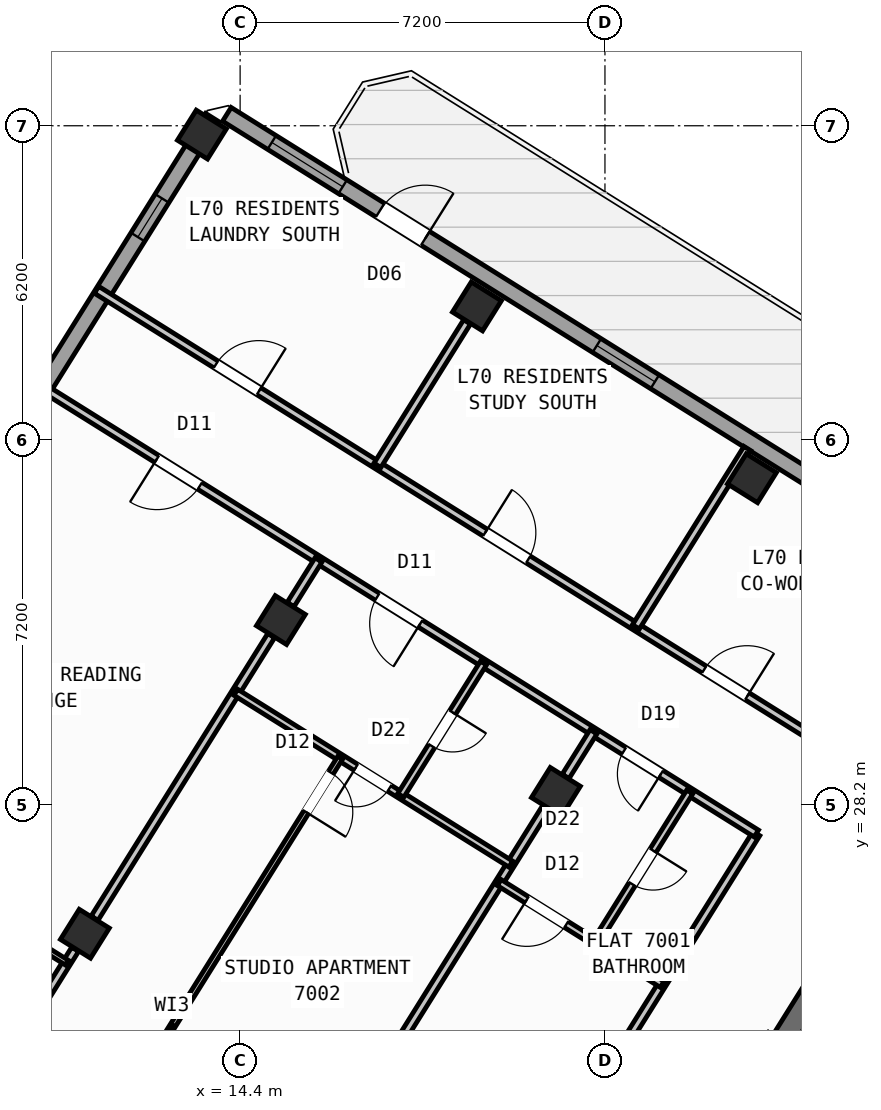
"""IFC4 building model, lengths in metres.
Left out: names, types, materials, properties, quantities, classifications, styles, units other than length and angle.
Written with IfcOpenShell. Run it as: python <this file> out.ifc"""

import sys

from ifc_helpers import new_model, si_unit, direction, frame, frame_2d, origin, origin_2d, place, context, subcontext, project, spatial, rectangle, hollow_rectangle, extrude, source, transform, mapped, element, fill, save


model = new_model("IFC4")
c1 = context("Model", 3, precision=1e-05, world=origin(), true_north=direction((0.0, 1.0)))
c2 = subcontext(c1, "Body", "Model", "MODEL_VIEW")
j1 = project(units=[si_unit("LENGTHUNIT", "METRE"), si_unit("PLANEANGLEUNIT", "RADIAN")], contexts=[c1])
p1 = place(None, origin())
s1 = spatial("IfcSite", under=j1, at=p1, CompositionType="ELEMENT")
p2 = place(p1, origin())
s2 = spatial("IfcBuilding", under=s1, at=p2, CompositionType="ELEMENT")
p3 = place(p2, frame((0.0, 0.0, 277.2)))
s3 = spatial("IfcBuildingStorey", under=s2, at=p3, CompositionType="ELEMENT", Elevation=277.2)
p4 = place(p3, frame((26.007, 24.976, 0.0), z_axis=(0.0, 0.0, 1.0), x_axis=(-0.529931155655, -0.848040665456, 0.0)))
e1 = element("IfcWall", 1, at=p4, inside=s3, PredefinedType="SHEAR", context=c2, shape_type="SweptSolid", body=[
    extrude(rectangle(XDim=6.475, YDim=0.45, at=frame_2d((3.238, 0.0))), origin(), (0.0, 0.0, 1.0), 3.35),
])
m1 = source(origin(), c2, "Body", "SweptSolid", [
    extrude(hollow_rectangle(XDim=0.7, YDim=0.7, WallThickness=0.028, at=origin_2d()), origin(), (0.0, 0.0, 1.0), 3.6),
])
for number, where, z_axis, x_axis in (
    (2, (24.5, 34.643, 0.0), (0.0, 0.0, 1.0), (-0.848, 0.53, 0.0)),
    (3, (20.632, 28.452, 0.0), (0.0, 0.0, 1.0), (-0.848, 0.53, 0.0)),
    (4, (19.073, 38.034, 0.0), (0.0, 0.0, 1.0), (-0.848, 0.53, 0.0)),
    (5, (15.205, 31.844, 0.0), (0.0, 0.0, 1.0), (-0.848, 0.53, 0.0)),
    (6, (11.336, 25.653, 0.0), (0.0, 0.0, 1.0), (-0.848, 0.53, 0.0)),
    (7, (13.646, 41.426, 0.0), (0.0, 0.0, 1.0), (-0.848, 0.53, 0.0)),
):
    element("IfcColumn", number, at=place(p3, frame(where, z_axis=z_axis, x_axis=x_axis)), inside=s3, PredefinedType="COLUMN", context=c2, shape_type="MappedRepresentation", body=[
        mapped(m1, transform((0.0, 0.0, 0.0), scale=1.0)),
    ])
p5 = place(p3, frame((2.415, 23.452, 0.0), z_axis=(0.0, 0.0, 1.0), x_axis=(0.52991049553, 0.848053575387, 0.0)))
e8 = element("IfcWall", 8, at=p5, inside=s3, PredefinedType="STANDARD", context=c2, shape_type="SweptSolid", body=[
    extrude(rectangle(XDim=21.587, YDim=0.32, at=frame_2d((10.794, 0.0))), origin(), (0.0, 0.0, 1.0), 3.35),
])
p6 = place(p5, frame((2.368, 0.0, 0.9)))
e9 = element("IfcOpeningElement", 9, at=p6, cuts=e8, PredefinedType="OPENING", context=c2, shape_type="SweptSolid", body=[
    extrude(rectangle(XDim=1.65, YDim=1.45, at=frame_2d((0.825, 0.725))), frame((0.0, 0.17, 0.0), z_axis=(0.0, -1.0, 0.0), x_axis=(1.0, 0.0, 0.0)), (0.0, 0.0, 1.0), 0.34),
])
p7 = place(p5, frame((8.094, 0.0, 0.9)))
e10 = element("IfcOpeningElement", 10, at=p7, cuts=e8, PredefinedType="OPENING", context=c2, shape_type="SweptSolid", body=[
    extrude(rectangle(XDim=1.35, YDim=1.45, at=frame_2d((0.675, 0.725))), frame((0.0, 0.17, 0.0), z_axis=(0.0, -1.0, 0.0), x_axis=(1.0, 0.0, 0.0)), (0.0, 0.0, 1.0), 0.34),
])
p8 = place(p5, frame((11.044, 0.0, 0.9)))
e11 = element("IfcOpeningElement", 11, at=p8, cuts=e8, PredefinedType="OPENING", context=c2, shape_type="SweptSolid", body=[
    extrude(rectangle(XDim=1.35, YDim=1.45, at=frame_2d((0.675, 0.725))), frame((0.0, 0.17, 0.0), z_axis=(0.0, -1.0, 0.0), x_axis=(1.0, 0.0, 0.0)), (0.0, 0.0, 1.0), 0.34),
])
p9 = place(p5, frame((18.809, 0.0, 1.0)))
e12 = element("IfcOpeningElement", 12, at=p9, cuts=e8, PredefinedType="OPENING", context=c2, shape_type="SweptSolid", body=[
    extrude(rectangle(XDim=0.9, YDim=1.25, at=frame_2d((0.45, 0.625))), frame((0.0, 0.17, 0.0), z_axis=(0.0, -1.0, 0.0), x_axis=(1.0, 0.0, 0.0)), (0.0, 0.0, 1.0), 0.34),
])
p10 = place(p3, frame((14.138, 41.825, 0.0), z_axis=(0.0, 0.0, 1.0), x_axis=(0.848046498049, -0.529921821731, 0.0)))
e13 = element("IfcWall", 13, at=p10, inside=s3, PredefinedType="STANDARD", context=c2, shape_type="SweptSolid", body=[
    extrude(rectangle(XDim=31.588, YDim=0.32, at=frame_2d((15.794, 0.0))), origin(), (0.0, 0.0, 1.0), 3.35),
])
p11 = place(p10, frame((3.568, 0.0, 0.0)))
e14 = element("IfcOpeningElement", 14, at=p11, cuts=e13, PredefinedType="OPENING", context=c2, shape_type="SweptSolid", body=[
    extrude(rectangle(XDim=1.05, YDim=2.15, at=frame_2d((0.525, 1.075))), frame((0.0, 0.17, 0.0), z_axis=(0.0, -1.0, 0.0), x_axis=(1.0, 0.0, 0.0)), (0.0, 0.0, 1.0), 0.34),
])
p12 = place(p10, frame((1.046, 0.0, 0.9)))
e15 = element("IfcOpeningElement", 15, at=p12, cuts=e13, PredefinedType="OPENING", context=c2, shape_type="SweptSolid", body=[
    extrude(rectangle(XDim=1.65, YDim=1.45, at=frame_2d((0.825, 0.725))), frame((0.0, 0.17, 0.0), z_axis=(0.0, -1.0, 0.0), x_axis=(1.0, 0.0, 0.0)), (0.0, 0.0, 1.0), 0.34),
])
p13 = place(p10, frame((8.61, 0.0, 0.9)))
e16 = element("IfcOpeningElement", 16, at=p13, cuts=e13, PredefinedType="OPENING", context=c2, shape_type="SweptSolid", body=[
    extrude(rectangle(XDim=1.35, YDim=1.45, at=frame_2d((0.675, 0.725))), frame((0.0, 0.17, 0.0), z_axis=(0.0, -1.0, 0.0), x_axis=(1.0, 0.0, 0.0)), (0.0, 0.0, 1.0), 0.34),
])
p14 = place(p10, frame((13.599, 0.0, 0.95)))
e17 = element("IfcOpeningElement", 17, at=p14, cuts=e13, PredefinedType="OPENING", context=c2, shape_type="SweptSolid", body=[
    extrude(rectangle(XDim=1.95, YDim=1.35, at=frame_2d((0.975, 0.675))), frame((0.0, 0.17, 0.0), z_axis=(0.0, -1.0, 0.0), x_axis=(1.0, 0.0, 0.0)), (0.0, 0.0, 1.0), 0.34),
])
p15 = place(p10, frame((17.154, 0.0, 1.0)))
e18 = element("IfcOpeningElement", 18, at=p15, cuts=e13, PredefinedType="OPENING", context=c2, shape_type="SweptSolid", body=[
    extrude(rectangle(XDim=0.9, YDim=1.25, at=frame_2d((0.45, 0.625))), frame((0.0, 0.17, 0.0), z_axis=(0.0, -1.0, 0.0), x_axis=(1.0, 0.0, 0.0)), (0.0, 0.0, 1.0), 0.34),
])
p16 = place(p10, frame((21.719, 0.0, 0.9)))
e19 = element("IfcOpeningElement", 19, at=p16, cuts=e13, PredefinedType="OPENING", context=c2, shape_type="SweptSolid", body=[
    extrude(rectangle(XDim=1.65, YDim=1.45, at=frame_2d((0.825, 0.725))), frame((0.0, 0.17, 0.0), z_axis=(0.0, -1.0, 0.0), x_axis=(1.0, 0.0, 0.0)), (0.0, 0.0, 1.0), 0.34),
])
p17 = place(p10, frame((27.419, 0.0, 0.9)))
e20 = element("IfcOpeningElement", 20, at=p17, cuts=e13, PredefinedType="OPENING", context=c2, shape_type="SweptSolid", body=[
    extrude(rectangle(XDim=1.65, YDim=1.45, at=frame_2d((0.825, 0.725))), frame((0.0, 0.17, 0.0), z_axis=(0.0, -1.0, 0.0), x_axis=(1.0, 0.0, 0.0)), (0.0, 0.0, 1.0), 0.34),
])
p18 = place(p3, frame((24.588, 27.631, 0.0), z_axis=(0.0, 0.0, 1.0), x_axis=(-0.529914586043, -0.848051019396, 0.0)))
e21 = element("IfcWall", 21, at=p18, inside=s3, PredefinedType="PARTITIONING", context=c2, shape_type="SweptSolid", body=[
    extrude(rectangle(XDim=15.35, YDim=0.16, at=frame_2d((7.675, 0.0))), origin(), (0.0, 0.0, 1.0), 3.34),
])
p19 = place(p3, frame((25.754, 29.497, 0.0), z_axis=(0.0, 0.0, 1.0), x_axis=(-0.848045850158, 0.529922858565, 0.0)))
e22 = element("IfcWall", 22, at=p19, inside=s3, PredefinedType="PARTITIONING", context=c2, shape_type="SweptSolid", body=[
    extrude(rectangle(XDim=16.73, YDim=0.16, at=frame_2d((8.365, 0.0))), origin(), (0.0, 0.0, 1.0), 3.34),
])
p20 = place(p19, frame((1.588, 0.0, 0.0)))
e23 = element("IfcOpeningElement", 23, at=p20, cuts=e22, PredefinedType="OPENING", context=c2, shape_type="SweptSolid", body=[
    extrude(rectangle(XDim=1.0, YDim=2.1, at=frame_2d((0.5, 1.05))), frame((0.0, 0.09, 0.0), z_axis=(0.0, -1.0, 0.0), x_axis=(1.0, 0.0, 0.0)), (0.0, 0.0, 1.0), 0.18),
])
p21 = place(p19, frame((6.685, 0.0, 0.0)))
e24 = element("IfcOpeningElement", 24, at=p21, cuts=e22, PredefinedType="OPENING", context=c2, shape_type="SweptSolid", body=[
    extrude(rectangle(XDim=1.0, YDim=2.1, at=frame_2d((0.5, 1.05))), frame((0.0, 0.09, 0.0), z_axis=(0.0, -1.0, 0.0), x_axis=(1.0, 0.0, 0.0)), (0.0, 0.0, 1.0), 0.18),
])
p22 = place(p19, frame((12.951, 0.0, 0.0)))
e25 = element("IfcOpeningElement", 25, at=p22, cuts=e22, PredefinedType="OPENING", context=c2, shape_type="SweptSolid", body=[
    extrude(rectangle(XDim=1.0, YDim=2.1, at=frame_2d((0.5, 1.05))), frame((0.0, 0.09, 0.0), z_axis=(0.0, -1.0, 0.0), x_axis=(1.0, 0.0, 0.0)), (0.0, 0.0, 1.0), 0.18),
])
p23 = place(p3, frame((24.588, 27.631, 0.0), z_axis=(0.0, 0.0, 1.0), x_axis=(-0.848041752158, 0.529929416617, 0.0)))
e26 = element("IfcWall", 26, at=p23, inside=s3, PredefinedType="PARTITIONING", context=c2, shape_type="SweptSolid", body=[
    extrude(rectangle(XDim=16.73, YDim=0.16, at=frame_2d((8.365, 0.0))), origin(), (0.0, 0.0, 1.0), 3.34),
])
p24 = place(p23, frame((2.22, 0.0, 0.0)))
e27 = element("IfcOpeningElement", 27, at=p24, cuts=e26, PredefinedType="OPENING", context=c2, shape_type="SweptSolid", body=[
    extrude(rectangle(XDim=0.86, YDim=2.05, at=frame_2d((0.43, 1.025))), frame((0.0, 0.09, 0.0), z_axis=(0.0, -1.0, 0.0), x_axis=(1.0, 0.0, 0.0)), (0.0, 0.0, 1.0), 0.18),
])
p25 = place(p23, frame((7.82, 0.0, 0.0)))
e28 = element("IfcOpeningElement", 28, at=p25, cuts=e26, PredefinedType="OPENING", context=c2, shape_type="SweptSolid", body=[
    extrude(rectangle(XDim=1.0, YDim=2.1, at=frame_2d((0.5, 1.05))), frame((0.0, 0.09, 0.0), z_axis=(0.0, -1.0, 0.0), x_axis=(1.0, 0.0, 0.0)), (0.0, 0.0, 1.0), 0.18),
])
p26 = place(p23, frame((12.95, 0.0, 0.0)))
e29 = element("IfcOpeningElement", 29, at=p26, cuts=e26, PredefinedType="OPENING", context=c2, shape_type="SweptSolid", body=[
    extrude(rectangle(XDim=1.0, YDim=2.1, at=frame_2d((0.5, 1.05))), frame((0.0, 0.09, 0.0), z_axis=(0.0, -1.0, 0.0), x_axis=(1.0, 0.0, 0.0)), (0.0, 0.0, 1.0), 0.18),
])
p27 = place(p3, frame((21.374, 29.639, 0.0), z_axis=(0.0, 0.0, 1.0), x_axis=(-0.529872092657, -0.848077570405, 0.0)))
e30 = element("IfcWall", 30, at=p27, inside=s3, PredefinedType="PARTITIONING", context=c2, shape_type="SweptSolid", body=[
    extrude(rectangle(XDim=1.038, YDim=0.16, at=frame_2d((0.519, 0.0))), origin(), (0.0, 0.0, 1.0), 2.875),
])
p28 = place(p3, frame((20.44, 28.145, 0.0), z_axis=(0.0, 0.0, 1.0), x_axis=(-0.529938869374, -0.84803584519, 0.0)))
e31 = element("IfcWall", 31, at=p28, inside=s3, PredefinedType="PARTITIONING", context=c2, shape_type="SweptSolid", body=[
    extrude(rectangle(XDim=6.576, YDim=0.16, at=frame_2d((3.288, 0.0))), origin(), (0.0, 0.0, 1.0), 2.875),
])
p29 = place(p3, frame((22.728, 24.654, 0.0), z_axis=(0.0, 0.0, 1.0), x_axis=(-0.848059820872, 0.529900500304, 0.0)))
e32 = element("IfcWall", 32, at=p29, inside=s3, PredefinedType="PLUMBINGWALL", context=c2, shape_type="SweptSolid", body=[
    extrude(rectangle(XDim=3.79, YDim=0.14, at=frame_2d((1.895, 0.0))), origin(), (0.0, 0.0, 1.0), 3.34),
])
p30 = place(p29, frame((2.23, 0.0, 0.0)))
e33 = element("IfcOpeningElement", 33, at=p30, cuts=e32, PredefinedType="OPENING", context=c2, shape_type="SweptSolid", body=[
    extrude(rectangle(XDim=0.92, YDim=2.08, at=frame_2d((0.46, 1.04))), frame((0.0, 0.08, 0.0), z_axis=(0.0, -1.0, 0.0), x_axis=(1.0, 0.0, 0.0)), (0.0, 0.0, 1.0), 0.16),
])
p31 = place(p3, frame((23.273, 28.452, 0.0), z_axis=(0.0, 0.0, 1.0), x_axis=(-0.529867639402, -0.848080352747, 0.0)))
e34 = element("IfcWall", 34, at=p31, inside=s3, PredefinedType="PLUMBINGWALL", context=c2, shape_type="SweptSolid", body=[
    extrude(rectangle(XDim=3.51, YDim=0.14, at=frame_2d((1.755, 0.0))), origin(), (0.0, 0.0, 1.0), 3.025),
])
p32 = place(p31, frame((1.365, 0.0, 0.0)))
e35 = element("IfcOpeningElement", 35, at=p32, cuts=e34, PredefinedType="OPENING", context=c2, shape_type="SweptSolid", body=[
    extrude(rectangle(XDim=0.78, YDim=2.05, at=frame_2d((0.39, 1.025))), frame((0.0, 0.08, 0.0), z_axis=(0.0, -1.0, 0.0), x_axis=(1.0, 0.0, 0.0)), (0.0, 0.0, 1.0), 0.16),
])
p33 = place(p3, frame((15.946, 33.031, 0.0), z_axis=(0.0, 0.0, 1.0), x_axis=(-0.529977795385, -0.848011519025, 0.0)))
e36 = element("IfcWall", 36, at=p33, inside=s3, PredefinedType="PARTITIONING", context=c2, shape_type="SweptSolid", body=[
    extrude(rectangle(XDim=1.038, YDim=0.16, at=frame_2d((0.519, 0.0))), origin(), (0.0, 0.0, 1.0), 2.875),
])
p34 = place(p3, frame((15.013, 31.537, 0.0), z_axis=(0.0, 0.0, 1.0), x_axis=(-0.529922185033, -0.848046271031, 0.0)))
e37 = element("IfcWall", 37, at=p34, inside=s3, PredefinedType="PARTITIONING", context=c2, shape_type="SweptSolid", body=[
    extrude(rectangle(XDim=6.576, YDim=0.16, at=frame_2d((3.288, 0.0))), origin(), (0.0, 0.0, 1.0), 2.875),
])
p35 = place(p3, frame((11.144, 25.346, 0.0), z_axis=(0.0, 0.0, 1.0), x_axis=(-0.529904903214, -0.848057069748, 0.0)))
e38 = element("IfcWall", 38, at=p35, inside=s3, PredefinedType="PARTITIONING", context=c2, shape_type="SweptSolid", body=[
    extrude(rectangle(XDim=5.601, YDim=0.16, at=frame_2d((2.801, 0.0))), origin(), (0.0, 0.0, 1.0), 2.875),
])
p36 = place(p3, frame((19.742, 27.027, 0.0), z_axis=(0.0, 0.0, 1.0), x_axis=(-0.848039019877, 0.529933789039, 0.0)))
e39 = element("IfcWall", 39, at=p36, inside=s3, PredefinedType="PLUMBINGWALL", context=c2, shape_type="SweptSolid", body=[
    extrude(rectangle(XDim=6.4, YDim=0.14, at=frame_2d((3.2, 0.0))), origin(), (0.0, 0.0, 1.0), 3.34),
])
p37 = place(p36, frame((2.824, 0.0, 0.0)))
e40 = element("IfcOpeningElement", 40, at=p37, cuts=e39, PredefinedType="OPENING", context=c2, shape_type="SweptSolid", body=[
    extrude(rectangle(XDim=0.78, YDim=2.05, at=frame_2d((0.39, 1.025))), frame((0.0, 0.08, 0.0), z_axis=(0.0, -1.0, 0.0), x_axis=(1.0, 0.0, 0.0)), (0.0, 0.0, 1.0), 0.16),
])
p38 = place(p3, frame((19.203, 30.996, 0.0), z_axis=(0.0, 0.0, 1.0), x_axis=(-0.52992768316, -0.848042835369, 0.0)))
e41 = element("IfcWall", 41, at=p38, inside=s3, PredefinedType="PLUMBINGWALL", context=c2, shape_type="SweptSolid", body=[
    extrude(rectangle(XDim=3.08, YDim=0.14, at=frame_2d((1.54, 0.0))), origin(), (0.0, 0.0, 1.0), 3.34),
])
p39 = place(p38, frame((1.15, 0.0, 0.0)))
e42 = element("IfcOpeningElement", 42, at=p39, cuts=e41, PredefinedType="OPENING", context=c2, shape_type="SweptSolid", body=[
    extrude(rectangle(XDim=0.78, YDim=2.05, at=frame_2d((0.39, 1.025))), frame((0.0, 0.08, 0.0), z_axis=(0.0, -1.0, 0.0), x_axis=(1.0, 0.0, 0.0)), (0.0, 0.0, 1.0), 0.16),
])
p40 = place(p3, frame((16.377, 29.13, 0.0), z_axis=(0.0, 0.0, 1.0), x_axis=(-0.529923687379, -0.848045332252, 0.0)))
e43 = element("IfcWall", 43, at=p40, inside=s3, PredefinedType="PARTITIONING", context=c2, shape_type="SweptSolid", body=[
    extrude(rectangle(XDim=12.54, YDim=0.11, at=frame_2d((6.27, 0.0))), origin(), (0.0, 0.0, 1.0), 3.34),
])
p41 = place(p40, frame((0.35, 0.0, 0.0)))
e44 = element("IfcOpeningElement", 44, at=p41, cuts=e43, PredefinedType="OPENING", context=c2, shape_type="SweptSolid", body=[
    extrude(rectangle(XDim=0.92, YDim=2.08, at=frame_2d((0.46, 1.04))), frame((0.0, 0.065, 0.0), z_axis=(0.0, -1.0, 0.0), x_axis=(1.0, 0.0, 0.0)), (0.0, 0.0, 1.0), 0.13),
])
p42 = place(p3, frame((10.98, 25.083, 0.0), z_axis=(0.0, 0.0, 1.0), x_axis=(-0.848048787466, 0.529918157905, 0.0)))
e45 = element("IfcWall", 45, at=p42, inside=s3, PredefinedType="PARTITIONING", context=c2, shape_type="SweptSolid", body=[
    extrude(rectangle(XDim=6.52, YDim=0.11, at=frame_2d((3.26, 0.0))), origin(), (0.0, 0.0, 1.0), 3.34),
])
p43 = place(p42, frame((2.8, 0.0, 0.0)))
e46 = element("IfcOpeningElement", 46, at=p43, cuts=e45, PredefinedType="OPENING", context=c2, shape_type="SweptSolid", body=[
    extrude(rectangle(XDim=0.92, YDim=2.08, at=frame_2d((0.46, 1.04))), frame((0.0, 0.065, 0.0), z_axis=(0.0, -1.0, 0.0), x_axis=(1.0, 0.0, 0.0)), (0.0, 0.0, 1.0), 0.13),
])
p44 = place(p3, frame((24.411, 35.229, 0.0), z_axis=(0.0, 0.0, 1.0), x_axis=(-0.529940769753, -0.848034657637, 0.0)))
e47 = element("IfcWall", 47, at=p44, inside=s3, PredefinedType="PARTITIONING", context=c2, shape_type="SweptSolid", body=[
    extrude(rectangle(XDim=4.15, YDim=0.16, at=frame_2d((2.075, 0.0))), origin(), (0.0, 0.0, 1.0), 3.34),
])
p45 = place(p3, frame((18.879, 37.729, 0.0), z_axis=(0.0, 0.0, 1.0), x_axis=(-0.529952920244, -0.848027064618, 0.0)))
e48 = element("IfcWall", 48, at=p45, inside=s3, PredefinedType="PARTITIONING", context=c2, shape_type="SweptSolid", body=[
    extrude(rectangle(XDim=3.338, YDim=0.16, at=frame_2d((1.669, 0.0))), origin(), (0.0, 0.0, 1.0), 2.875),
])
m2 = source(origin(), c2, "Body", "SweptSolid", [
    extrude(rectangle(XDim=1.05, YDim=2.15, at=frame_2d((0.525, 1.075))), frame((0.0, 0.025, 0.0), z_axis=(0.0, -1.0, 0.0), x_axis=(1.0, 0.0, 0.0)), (0.0, 0.0, 1.0), 0.05),
])
p46 = place(p11, origin())
e49 = element("IfcDoor", 49, at=p46, inside=s3, OperationType="SINGLE_SWING_RIGHT", PredefinedType="DOOR", context=c2, shape_type="MappedRepresentation", body=[
    mapped(m2, transform((0.0, 0.0, 0.0), scale=1.0)),
])
fill(e14, e49)
m3 = source(origin(), c2, "Body", "SweptSolid", [
    extrude(rectangle(XDim=0.9, YDim=1.25, at=frame_2d((0.45, 0.625))), frame((0.0, 0.03, 0.0), z_axis=(0.0, -1.0, 0.0), x_axis=(1.0, 0.0, 0.0)), (0.0, 0.0, 1.0), 0.06),
])
p47 = place(p9, origin())
e50 = element("IfcWindow", 50, at=p47, inside=s3, PartitioningType="SINGLE_PANEL", PredefinedType="WINDOW", context=c2, shape_type="MappedRepresentation", body=[
    mapped(m3, transform((0.0, 0.0, 0.0), scale=1.0)),
])
fill(e12, e50)
m4 = source(origin(), c2, "Body", "SweptSolid", [
    extrude(rectangle(XDim=1.65, YDim=1.45, at=frame_2d((0.825, 0.725))), frame((0.0, 0.03, 0.0), z_axis=(0.0, -1.0, 0.0), x_axis=(1.0, 0.0, 0.0)), (0.0, 0.0, 1.0), 0.06),
])
p48 = place(p12, origin())
e51 = element("IfcWindow", 51, at=p48, inside=s3, PartitioningType="SINGLE_PANEL", PredefinedType="WINDOW", context=c2, shape_type="MappedRepresentation", body=[
    mapped(m4, transform((0.0, 0.0, 0.0), scale=1.0)),
])
fill(e15, e51)
m5 = source(origin(), c2, "Body", "SweptSolid", [
    extrude(rectangle(XDim=1.35, YDim=1.45, at=frame_2d((0.675, 0.725))), frame((0.0, 0.03, 0.0), z_axis=(0.0, -1.0, 0.0), x_axis=(1.0, 0.0, 0.0)), (0.0, 0.0, 1.0), 0.06),
])
p49 = place(p13, origin())
e52 = element("IfcWindow", 52, at=p49, inside=s3, PartitioningType="SINGLE_PANEL", PredefinedType="WINDOW", context=c2, shape_type="MappedRepresentation", body=[
    mapped(m5, transform((0.0, 0.0, 0.0), scale=1.0)),
])
fill(e16, e52)
m6 = source(origin(), c2, "Body", "SweptSolid", [
    extrude(rectangle(XDim=0.86, YDim=2.05, at=frame_2d((0.43, 1.025))), frame((0.0, 0.025, 0.0), z_axis=(0.0, -1.0, 0.0), x_axis=(1.0, 0.0, 0.0)), (0.0, 0.0, 1.0), 0.05),
])
p50 = place(p24, origin())
e53 = element("IfcDoor", 53, at=p50, inside=s3, OperationType="SINGLE_SWING_LEFT", PredefinedType="DOOR", context=c2, shape_type="MappedRepresentation", body=[
    mapped(m6, transform((0.0, 0.0, 0.0), scale=1.0)),
])
fill(e27, e53)
m7 = source(origin(), c2, "Body", "SweptSolid", [
    extrude(rectangle(XDim=0.92, YDim=2.08, at=frame_2d((0.46, 1.04))), frame((0.0, 0.025, 0.0), z_axis=(0.0, -1.0, 0.0), x_axis=(1.0, 0.0, 0.0)), (0.0, 0.0, 1.0), 0.05),
])
p51 = place(p30, origin())
e54 = element("IfcDoor", 54, at=p51, inside=s3, OperationType="SINGLE_SWING_RIGHT", PredefinedType="DOOR", context=c2, shape_type="MappedRepresentation", body=[
    mapped(m7, transform((0.0, 0.0, 0.0), scale=1.0)),
])
fill(e33, e54)
m8 = source(origin(), c2, "Body", "SweptSolid", [
    extrude(rectangle(XDim=0.78, YDim=2.05, at=frame_2d((0.39, 1.025))), frame((0.0, 0.025, 0.0), z_axis=(0.0, -1.0, 0.0), x_axis=(1.0, 0.0, 0.0)), (0.0, 0.0, 1.0), 0.05),
])
p52 = place(p32, origin())
e55 = element("IfcDoor", 55, at=p52, inside=s3, OperationType="SINGLE_SWING_LEFT", PredefinedType="DOOR", context=c2, shape_type="MappedRepresentation", body=[
    mapped(m8, transform((0.0, 0.0, 0.0), scale=1.0)),
])
fill(e35, e55)
p53 = place(p41, origin())
e56 = element("IfcDoor", 56, at=p53, inside=s3, OperationType="SINGLE_SWING_RIGHT", PredefinedType="DOOR", context=c2, shape_type="MappedRepresentation", body=[
    mapped(m7, transform((0.0, 0.0, 0.0), scale=1.0)),
])
fill(e44, e56)
m9 = source(origin(), c2, "Body", "SweptSolid", [
    extrude(rectangle(XDim=1.0, YDim=2.1, at=frame_2d((0.5, 1.05))), frame((0.0, 0.025, 0.0), z_axis=(0.0, -1.0, 0.0), x_axis=(1.0, 0.0, 0.0)), (0.0, 0.0, 1.0), 0.05),
])
p54 = place(p25, origin())
e57 = element("IfcDoor", 57, at=p54, inside=s3, OperationType="SINGLE_SWING_LEFT", PredefinedType="DOOR", context=c2, shape_type="MappedRepresentation", body=[
    mapped(m9, transform((0.0, 0.0, 0.0), scale=1.0)),
])
fill(e28, e57)
p55 = place(p37, origin())
e58 = element("IfcDoor", 58, at=p55, inside=s3, OperationType="SINGLE_SWING_RIGHT", PredefinedType="DOOR", context=c2, shape_type="MappedRepresentation", body=[
    mapped(m8, transform((0.0, 0.0, 0.0), scale=1.0)),
])
fill(e40, e58)
p56 = place(p39, origin())
e59 = element("IfcDoor", 59, at=p56, inside=s3, OperationType="SINGLE_SWING_LEFT", PredefinedType="DOOR", context=c2, shape_type="MappedRepresentation", body=[
    mapped(m8, transform((0.0, 0.0, 0.0), scale=1.0)),
])
fill(e42, e59)
p57 = place(p26, origin())
e60 = element("IfcDoor", 60, at=p57, inside=s3, OperationType="SINGLE_SWING_RIGHT", PredefinedType="DOOR", context=c2, shape_type="MappedRepresentation", body=[
    mapped(m9, transform((0.0, 0.0, 0.0), scale=1.0)),
])
fill(e29, e60)
p58 = place(p20, frame((1.0, 0.0, 0.0), z_axis=(0.0, 0.0, 1.0), x_axis=(-1.0, 0.0, 0.0)))
e61 = element("IfcDoor", 61, at=p58, inside=s3, OperationType="SINGLE_SWING_RIGHT", PredefinedType="DOOR", context=c2, shape_type="MappedRepresentation", body=[
    mapped(m9, transform((0.0, 0.0, 0.0), scale=1.0)),
])
fill(e23, e61)
p59 = place(p21, frame((1.0, 0.0, 0.0), z_axis=(0.0, 0.0, 1.0), x_axis=(-1.0, 0.0, 0.0)))
e62 = element("IfcDoor", 62, at=p59, inside=s3, OperationType="SINGLE_SWING_LEFT", PredefinedType="DOOR", context=c2, shape_type="MappedRepresentation", body=[
    mapped(m9, transform((0.0, 0.0, 0.0), scale=1.0)),
])
fill(e24, e62)
p60 = place(p22, frame((1.0, 0.0, 0.0), z_axis=(0.0, 0.0, 1.0), x_axis=(-1.0, 0.0, 0.0)))
e63 = element("IfcDoor", 63, at=p60, inside=s3, OperationType="SINGLE_SWING_RIGHT", PredefinedType="DOOR", context=c2, shape_type="MappedRepresentation", body=[
    mapped(m9, transform((0.0, 0.0, 0.0), scale=1.0)),
])
fill(e25, e63)
save(model, sys.argv[1])
